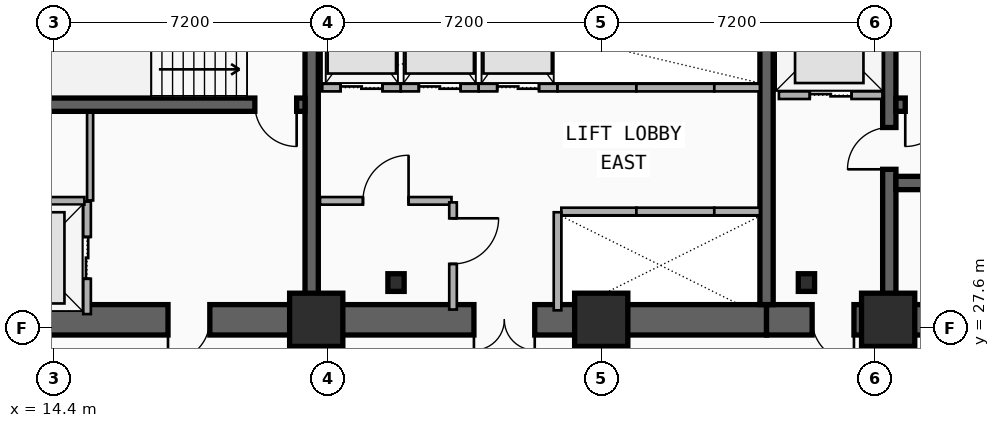
"""IFC4 building model, lengths in metres.
Left out: names, types, materials, properties, quantities, classifications, styles, units other than length and angle.
Written with IfcOpenShell. Run it as: python <this file> out.ifc"""

import sys

from ifc_helpers import new_model, si_unit, direction, frame, frame_2d, origin, origin_2d, place, context, subcontext, project, spatial, rectangle, i_section, extrude, element, fill, save


model = new_model("IFC4")
c1 = context("Model", 3, precision=1e-05, world=origin(), true_north=direction((0.0, 1.0)))
c2 = subcontext(c1, "Body", "Model", "MODEL_VIEW")
j1 = project(units=[si_unit("LENGTHUNIT", "METRE"), si_unit("PLANEANGLEUNIT", "RADIAN")], contexts=[c1])
p1 = place(None, origin())
s1 = spatial("IfcSite", under=j1, at=p1, CompositionType="ELEMENT")
p2 = place(p1, origin())
s2 = spatial("IfcBuilding", under=s1, at=p2, CompositionType="ELEMENT")
p3 = place(p2, frame((0.0, 0.0, 29.0)))
s3 = spatial("IfcBuildingStorey", under=s2, at=p3, CompositionType="ELEMENT", Elevation=29.0)
p4 = place(p3, frame((21.18, 27.82, 0.0), z_axis=(0.0, 0.0, 1.0), x_axis=(-1.0, 0.0, 0.0)))
e1 = element("IfcWall", 1, at=p4, inside=s3, PredefinedType="SHEAR", context=c2, shape_type="SweptSolid", body=[
    extrude(rectangle(XDim=9.03, YDim=0.8, at=frame_2d((4.515, 0.0))), origin(), (0.0, 0.0, 1.0), 3.5),
])
p5 = place(p4, frame((2.68, 0.0, 0.0)))
e2 = element("IfcOpeningElement", 2, at=p5, cuts=e1, PredefinedType="OPENING", context=c2, shape_type="SweptSolid", body=[
    extrude(rectangle(XDim=1.1, YDim=2.15, at=frame_2d((0.55, 1.075))), frame((0.0, 0.41, 0.0), z_axis=(0.0, -1.0, 0.0), x_axis=(1.0, 0.0, 0.0)), (0.0, 0.0, 1.0), 0.82),
])
p6 = place(p3, frame((33.15, 27.82, 0.0), z_axis=(0.0, 0.0, 1.0), x_axis=(-1.0, 0.0, 0.0)))
e3 = element("IfcWall", 3, at=p6, inside=s3, PredefinedType="SHEAR", context=c2, shape_type="SweptSolid", body=[
    extrude(rectangle(XDim=11.97, YDim=0.8, at=frame_2d((5.985, 0.0))), origin(), (0.0, 0.0, 1.0), 3.5),
])
p7 = place(p6, frame((6.1, 0.0, 0.0)))
e4 = element("IfcOpeningElement", 4, at=p7, cuts=e3, PredefinedType="OPENING", context=c2, shape_type="SweptSolid", body=[
    extrude(rectangle(XDim=1.6, YDim=2.2, at=frame_2d((0.8, 1.1))), frame((0.0, 0.41, 0.0), z_axis=(0.0, -1.0, 0.0), x_axis=(1.0, 0.0, 0.0)), (0.0, 0.0, 1.0), 0.82),
])
p8 = place(p3, frame((45.38, 27.82, 0.0), z_axis=(0.0, 0.0, 1.0), x_axis=(-1.0, 0.0, 0.0)))
e5 = element("IfcWall", 5, at=p8, inside=s3, PredefinedType="SHEAR", context=c2, shape_type="SweptSolid", body=[
    extrude(rectangle(XDim=12.23, YDim=0.8, at=frame_2d((6.115, 0.0))), origin(), (0.0, 0.0, 1.0), 3.5),
])
p9 = place(p8, frame((9.93, 0.0, 0.0)))
e6 = element("IfcOpeningElement", 6, at=p9, cuts=e5, PredefinedType="OPENING", context=c2, shape_type="SweptSolid", body=[
    extrude(rectangle(XDim=1.1, YDim=2.15, at=frame_2d((0.55, 1.075))), frame((0.0, 0.41, 0.0), z_axis=(0.0, -1.0, 0.0), x_axis=(1.0, 0.0, 0.0)), (0.0, 0.0, 1.0), 0.82),
])
p10 = place(p8, frame((6.23, 0.0, 0.0)))
e7 = element("IfcOpeningElement", 7, at=p10, cuts=e5, PredefinedType="OPENING", context=c2, shape_type="SweptSolid", body=[
    extrude(rectangle(XDim=1.1, YDim=2.15, at=frame_2d((0.55, 1.075))), frame((0.0, 0.41, 0.0), z_axis=(0.0, -1.0, 0.0), x_axis=(1.0, 0.0, 0.0)), (0.0, 0.0, 1.0), 0.82),
])
for number, where, z_axis, x_axis in (
    (8, (21.18, 28.22, 0.0), (0.0, 0.0, 1.0), (0.0, 1.0, 0.0)),
    (9, (33.15, 28.22, 0.0), (0.0, 0.0, 1.0), (0.0, 1.0, 0.0)),
):
    element("IfcWall", number, at=place(p3, frame(where, z_axis=z_axis, x_axis=x_axis)), inside=s3, PredefinedType="SHEAR", context=c2, shape_type="SweptSolid", body=[
        extrude(rectangle(XDim=8.43, YDim=0.35, at=frame_2d((4.215, 0.0))), origin(), (0.0, 0.0, 1.0), 3.5),
    ])
p11 = place(p3, frame((36.38, 28.22, 0.0), z_axis=(0.0, 0.0, 1.0), x_axis=(0.0, 1.0, 0.0)))
e10 = element("IfcWall", 10, at=p11, inside=s3, PredefinedType="SHEAR", context=c2, shape_type="SweptSolid", body=[
    extrude(rectangle(XDim=8.43, YDim=0.35, at=frame_2d((4.215, 0.0))), origin(), (0.0, 0.0, 1.0), 3.5),
])
p12 = place(p11, frame((3.56, 0.0, 0.0)))
e11 = element("IfcOpeningElement", 11, at=p12, cuts=e10, PredefinedType="OPENING", context=c2, shape_type="SweptSolid", body=[
    extrude(rectangle(XDim=1.1, YDim=2.15, at=frame_2d((0.55, 1.075))), frame((0.0, 0.185, 0.0), z_axis=(0.0, -1.0, 0.0), x_axis=(1.0, 0.0, 0.0)), (0.0, 0.0, 1.0), 0.37),
])
p13 = place(p3, frame((21.005, 33.48, 0.0), z_axis=(0.0, 0.0, 1.0), x_axis=(-1.0, 0.0, 0.0)))
e12 = element("IfcWall", 12, at=p13, inside=s3, PredefinedType="SHEAR", context=c2, shape_type="SweptSolid", body=[
    extrude(rectangle(XDim=8.455, YDim=0.35, at=frame_2d((4.228, 0.0))), origin(), (0.0, 0.0, 1.0), 3.5),
])
p14 = place(p13, frame((0.22, 0.0, 0.0)))
e13 = element("IfcOpeningElement", 13, at=p14, cuts=e12, PredefinedType="OPENING", context=c2, shape_type="SweptSolid", body=[
    extrude(rectangle(XDim=1.1, YDim=2.15, at=frame_2d((0.55, 1.075))), frame((0.0, 0.185, 0.0), z_axis=(0.0, -1.0, 0.0), x_axis=(1.0, 0.0, 0.0)), (0.0, 0.0, 1.0), 0.37),
])
p15 = place(p3, frame((44.98, 33.48, 0.0), z_axis=(0.0, 0.0, 1.0), x_axis=(-1.0, 0.0, 0.0)))
e14 = element("IfcWall", 14, at=p15, inside=s3, PredefinedType="SHEAR", context=c2, shape_type="SweptSolid", body=[
    extrude(rectangle(XDim=8.425, YDim=0.35, at=frame_2d((4.212, 0.0))), origin(), (0.0, 0.0, 1.0), 3.5),
])
p16 = place(p15, frame((7.08, 0.0, 0.0)))
e15 = element("IfcOpeningElement", 15, at=p16, cuts=e14, PredefinedType="OPENING", context=c2, shape_type="SweptSolid", body=[
    extrude(rectangle(XDim=1.1, YDim=2.15, at=frame_2d((0.55, 1.075))), frame((0.0, 0.185, 0.0), z_axis=(0.0, -1.0, 0.0), x_axis=(1.0, 0.0, 0.0)), (0.0, 0.0, 1.0), 0.37),
])
p17 = place(p3, frame((36.555, 31.42, 0.0), z_axis=(0.0, 0.0, 1.0), x_axis=(1.0, 0.0, 0.0)))
e16 = element("IfcWall", 16, at=p17, inside=s3, PredefinedType="SHEAR", context=c2, shape_type="SweptSolid", body=[
    extrude(rectangle(XDim=8.425, YDim=0.35, at=frame_2d((4.212, 0.0))), origin(), (0.0, 0.0, 1.0), 3.5),
])
for number, where, z_axis, x_axis in (
    (17, (23.4, 28.8, 0.0), (0.0, 0.0, 1.0), (1.0, 0.0, 0.0)),
    (18, (34.2, 28.8, 0.0), (0.0, 0.0, 1.0), (1.0, 0.0, 0.0)),
):
    element("IfcColumn", number, at=place(p3, frame(where, z_axis=z_axis, x_axis=x_axis)), inside=s3, PredefinedType="COLUMN", context=c2, shape_type="SweptSolid", body=[
        extrude(i_section(OverallWidth=0.428, OverallDepth=0.465, WebThickness=0.045, FlangeThickness=0.073, FilletRadius=0.015, at=origin_2d()), origin(), (0.0, 0.0, 1.0), 3.5),
    ])
for number, where, z_axis, x_axis in (
    (19, (21.3, 27.82, 0.0), (0.0, 0.0, 1.0), (1.0, 0.0, 0.0)),
    (20, (28.8, 27.82, 0.0), (0.0, 0.0, 1.0), (1.0, 0.0, 0.0)),
    (21, (36.35, 27.82, 0.0), (0.0, 0.0, 1.0), (1.0, 0.0, 0.0)),
):
    element("IfcColumn", number, at=place(p3, frame(where, z_axis=z_axis, x_axis=x_axis)), inside=s3, PredefinedType="COLUMN", context=c2, shape_type="SweptSolid", body=[
        extrude(rectangle(XDim=1.4, YDim=1.4, at=origin_2d()), origin(), (0.0, 0.0, 1.0), 3.5),
    ])
p18 = place(p3, frame((15.27, 27.97, 0.0), z_axis=(0.0, 0.0, 1.0), x_axis=(0.0, 1.0, 0.0)))
e22 = element("IfcWall", 22, at=p18, inside=s3, PredefinedType="PARTITIONING", context=c2, shape_type="SweptSolid", body=[
    extrude(rectangle(XDim=2.96, YDim=0.2, at=frame_2d((1.48, 0.0))), origin(), (0.0, 0.0, 1.0), 2.212),
])
p19 = place(p18, frame((0.93, 0.0, 0.0)))
e23 = element("IfcOpeningElement", 23, at=p19, cuts=e22, PredefinedType="OPENING", context=c2, shape_type="SweptSolid", body=[
    extrude(rectangle(XDim=1.1, YDim=2.15, at=frame_2d((0.55, 1.075))), frame((0.0, 0.11, 0.0), z_axis=(0.0, -1.0, 0.0), x_axis=(1.0, 0.0, 0.0)), (0.0, 0.0, 1.0), 0.22),
])
p20 = place(p3, frame((12.45, 30.95, 0.0), z_axis=(0.0, 0.0, 1.0), x_axis=(1.0, 0.0, 0.0)))
e24 = element("IfcWall", 24, at=p20, inside=s3, PredefinedType="PARTITIONING", context=c2, shape_type="SweptSolid", body=[
    extrude(rectangle(XDim=2.75, YDim=0.2, at=frame_2d((1.375, 0.0))), origin(), (0.0, 0.0, 1.0), 2.212),
])
p21 = place(p3, frame((33.475, 33.73, 0.0), z_axis=(0.0, 0.0, 1.0), x_axis=(1.0, 0.0, 0.0)))
e25 = element("IfcWall", 25, at=p21, inside=s3, PredefinedType="PARTITIONING", context=c2, shape_type="SweptSolid", body=[
    extrude(rectangle(XDim=2.725, YDim=0.2, at=frame_2d((1.362, 0.0))), origin(), (0.0, 0.0, 1.0), 2.212),
])
p22 = place(p21, frame((0.812, 0.0, 0.0)))
e26 = element("IfcOpeningElement", 26, at=p22, cuts=e25, PredefinedType="OPENING", context=c2, shape_type="SweptSolid", body=[
    extrude(rectangle(XDim=1.1, YDim=2.15, at=frame_2d((0.55, 1.075))), frame((0.0, 0.11, 0.0), z_axis=(0.0, -1.0, 0.0), x_axis=(1.0, 0.0, 0.0)), (0.0, 0.0, 1.0), 0.22),
])
p23 = place(p3, frame((27.75, 30.67, 0.0), z_axis=(0.0, 0.0, 1.0), x_axis=(1.0, 0.0, 0.0)))
e27 = element("IfcWall", 27, at=p23, inside=s3, PredefinedType="PARTITIONING", context=c2, shape_type="SweptSolid", body=[
    extrude(rectangle(XDim=1.975, YDim=0.2, at=frame_2d((0.988, 0.0))), origin(), (0.0, 0.0, 1.0), 2.212),
])
p24 = place(p3, frame((27.65, 28.07, 0.0), z_axis=(0.0, 0.0, 1.0), x_axis=(0.0, 1.0, 0.0)))
e28 = element("IfcWall", 28, at=p24, inside=s3, PredefinedType="PARTITIONING", context=c2, shape_type="SweptSolid", body=[
    extrude(rectangle(XDim=2.58, YDim=0.2, at=frame_2d((1.29, 0.0))), origin(), (0.0, 0.0, 1.0), 2.212),
])
p25 = place(p3, frame((29.725, 30.67, 0.0), z_axis=(0.0, 0.0, 1.0), x_axis=(1.0, 0.0, 0.0)))
e29 = element("IfcWall", 29, at=p25, inside=s3, PredefinedType="PARTITIONING", context=c2, shape_type="SweptSolid", body=[
    extrude(rectangle(XDim=2.05, YDim=0.2, at=frame_2d((1.025, 0.0))), origin(), (0.0, 0.0, 1.0), 2.62),
])
p26 = place(p3, frame((31.775, 30.67, 0.0), z_axis=(0.0, 0.0, 1.0), x_axis=(1.0, 0.0, 0.0)))
e30 = element("IfcWall", 30, at=p26, inside=s3, PredefinedType="PARTITIONING", context=c2, shape_type="SweptSolid", body=[
    extrude(rectangle(XDim=1.2, YDim=0.2, at=frame_2d((0.6, 0.0))), origin(), (0.0, 0.0, 1.0), 2.62),
])
p27 = place(p3, frame((21.46, 33.93, 0.0), z_axis=(0.0, 0.0, 1.0), x_axis=(1.0, 0.0, 0.0)))
e31 = element("IfcWall", 31, at=p27, inside=s3, PredefinedType="PARTITIONING", context=c2, shape_type="SweptSolid", body=[
    extrude(rectangle(XDim=2.065, YDim=0.2, at=frame_2d((1.032, 0.0))), origin(), (0.0, 0.0, 1.0), 2.212),
])
p28 = place(p27, frame((0.482, 0.0, 0.0)))
e32 = element("IfcOpeningElement", 32, at=p28, cuts=e31, PredefinedType="OPENING", context=c2, shape_type="SweptSolid", body=[
    extrude(rectangle(XDim=1.1, YDim=2.15, at=frame_2d((0.55, 1.075))), frame((0.0, 0.11, 0.0), z_axis=(0.0, -1.0, 0.0), x_axis=(1.0, 0.0, 0.0)), (0.0, 0.0, 1.0), 0.22),
])
p29 = place(p3, frame((23.525, 33.93, 0.0), z_axis=(0.0, 0.0, 1.0), x_axis=(1.0, 0.0, 0.0)))
e33 = element("IfcWall", 33, at=p29, inside=s3, PredefinedType="PARTITIONING", context=c2, shape_type="SweptSolid", body=[
    extrude(rectangle(XDim=2.05, YDim=0.2, at=frame_2d((1.025, 0.0))), origin(), (0.0, 0.0, 1.0), 3.24),
])
p30 = place(p29, frame((0.475, 0.0, 0.0)))
e34 = element("IfcOpeningElement", 34, at=p30, cuts=e33, PredefinedType="OPENING", context=c2, shape_type="SweptSolid", body=[
    extrude(rectangle(XDim=1.1, YDim=2.15, at=frame_2d((0.55, 1.075))), frame((0.0, 0.11, 0.0), z_axis=(0.0, -1.0, 0.0), x_axis=(1.0, 0.0, 0.0)), (0.0, 0.0, 1.0), 0.22),
])
p31 = place(p3, frame((25.575, 33.93, 0.0), z_axis=(0.0, 0.0, 1.0), x_axis=(1.0, 0.0, 0.0)))
e35 = element("IfcWall", 35, at=p31, inside=s3, PredefinedType="PARTITIONING", context=c2, shape_type="SweptSolid", body=[
    extrude(rectangle(XDim=2.075, YDim=0.2, at=frame_2d((1.038, 0.0))), origin(), (0.0, 0.0, 1.0), 3.24),
])
p32 = place(p31, frame((0.488, 0.0, 0.0)))
e36 = element("IfcOpeningElement", 36, at=p32, cuts=e35, PredefinedType="OPENING", context=c2, shape_type="SweptSolid", body=[
    extrude(rectangle(XDim=1.1, YDim=2.15, at=frame_2d((0.55, 1.075))), frame((0.0, 0.11, 0.0), z_axis=(0.0, -1.0, 0.0), x_axis=(1.0, 0.0, 0.0)), (0.0, 0.0, 1.0), 0.22),
])
p33 = place(p3, frame((27.65, 33.93, 0.0), z_axis=(0.0, 0.0, 1.0), x_axis=(1.0, 0.0, 0.0)))
e37 = element("IfcWall", 37, at=p33, inside=s3, PredefinedType="PARTITIONING", context=c2, shape_type="SweptSolid", body=[
    extrude(rectangle(XDim=2.075, YDim=0.2, at=frame_2d((1.038, 0.0))), origin(), (0.0, 0.0, 1.0), 2.212),
])
p34 = place(p3, frame((29.725, 33.93, 0.0), z_axis=(0.0, 0.0, 1.0), x_axis=(1.0, 0.0, 0.0)))
e38 = element("IfcWall", 38, at=p34, inside=s3, PredefinedType="PARTITIONING", context=c2, shape_type="SweptSolid", body=[
    extrude(rectangle(XDim=2.05, YDim=0.2, at=frame_2d((1.025, 0.0))), origin(), (0.0, 0.0, 1.0), 3.24),
])
p35 = place(p3, frame((31.775, 33.93, 0.0), z_axis=(0.0, 0.0, 1.0), x_axis=(1.0, 0.0, 0.0)))
e39 = element("IfcWall", 39, at=p35, inside=s3, PredefinedType="PARTITIONING", context=c2, shape_type="SweptSolid", body=[
    extrude(rectangle(XDim=1.2, YDim=0.2, at=frame_2d((0.6, 0.0))), origin(), (0.0, 0.0, 1.0), 3.24),
])
p36 = place(p3, frame((21.4, 30.95, 0.0), z_axis=(0.0, 0.0, 1.0), x_axis=(1.0, 0.0, 0.0)))
e40 = element("IfcWall", 40, at=p36, inside=s3, PredefinedType="PARTITIONING", context=c2, shape_type="SweptSolid", body=[
    extrude(rectangle(XDim=3.46, YDim=0.2, at=frame_2d((1.73, 0.0))), origin(), (0.0, 0.0, 1.0), 2.28),
])
p37 = place(p36, frame((1.13, 0.0, 0.0)))
e41 = element("IfcOpeningElement", 41, at=p37, cuts=e40, PredefinedType="OPENING", context=c2, shape_type="SweptSolid", body=[
    extrude(rectangle(XDim=1.2, YDim=2.15, at=frame_2d((0.6, 1.075))), frame((0.0, 0.11, 0.0), z_axis=(0.0, -1.0, 0.0), x_axis=(1.0, 0.0, 0.0)), (0.0, 0.0, 1.0), 0.22),
])
p38 = place(p3, frame((24.9, 30.91, 0.0), z_axis=(0.0, 0.0, 1.0), x_axis=(0.0, -1.0, 0.0)))
e42 = element("IfcWall", 42, at=p38, inside=s3, PredefinedType="PARTITIONING", context=c2, shape_type="SweptSolid", body=[
    extrude(rectangle(XDim=2.82, YDim=0.2, at=frame_2d((1.41, 0.0))), origin(), (0.0, 0.0, 1.0), 2.62),
])
p39 = place(p38, frame((0.419, 0.0, 0.0)))
e43 = element("IfcOpeningElement", 43, at=p39, cuts=e42, PredefinedType="OPENING", context=c2, shape_type="SweptSolid", body=[
    extrude(rectangle(XDim=1.2, YDim=2.15, at=frame_2d((0.6, 1.075))), frame((0.0, 0.11, 0.0), z_axis=(0.0, -1.0, 0.0), x_axis=(1.0, 0.0, 0.0)), (0.0, 0.0, 1.0), 0.22),
])
p40 = place(p3, frame((15.35, 30.96, 0.0), z_axis=(0.0, 0.0, 1.0), x_axis=(0.0, 1.0, 0.0)))
e44 = element("IfcWall", 44, at=p40, inside=s3, PredefinedType="PARTITIONING", context=c2, shape_type="SweptSolid", body=[
    extrude(rectangle(XDim=2.31, YDim=0.16, at=frame_2d((1.155, 0.0))), origin(), (0.0, 0.0, 1.0), 3.24),
])
p41 = place(p19, origin())
e45 = element("IfcDoor", 45, at=p41, inside=s3, OperationType="DOUBLE_DOOR_SLIDING", PredefinedType="DOOR", context=c2, shape_type="SweptSolid", body=[
    extrude(rectangle(XDim=1.1, YDim=2.15, at=frame_2d((0.55, 1.075))), frame((0.0, 0.025, 0.0), z_axis=(0.0, -1.0, 0.0), x_axis=(1.0, 0.0, 0.0)), (0.0, 0.0, 1.0), 0.05),
])
fill(e23, e45)
p42 = place(p22, origin())
e46 = element("IfcDoor", 46, at=p42, inside=s3, OperationType="DOUBLE_DOOR_SLIDING", PredefinedType="DOOR", context=c2, shape_type="SweptSolid", body=[
    extrude(rectangle(XDim=1.1, YDim=2.15, at=frame_2d((0.55, 1.075))), frame((0.0, 0.025, 0.0), z_axis=(0.0, -1.0, 0.0), x_axis=(1.0, 0.0, 0.0)), (0.0, 0.0, 1.0), 0.05),
])
fill(e26, e46)
p43 = place(p28, origin())
e47 = element("IfcDoor", 47, at=p43, inside=s3, OperationType="DOUBLE_DOOR_SLIDING", PredefinedType="DOOR", context=c2, shape_type="SweptSolid", body=[
    extrude(rectangle(XDim=1.1, YDim=2.15, at=frame_2d((0.55, 1.075))), frame((0.0, 0.025, 0.0), z_axis=(0.0, -1.0, 0.0), x_axis=(1.0, 0.0, 0.0)), (0.0, 0.0, 1.0), 0.05),
])
fill(e32, e47)
p44 = place(p30, origin())
e48 = element("IfcDoor", 48, at=p44, inside=s3, OperationType="DOUBLE_DOOR_SLIDING", PredefinedType="DOOR", context=c2, shape_type="SweptSolid", body=[
    extrude(rectangle(XDim=1.1, YDim=2.15, at=frame_2d((0.55, 1.075))), frame((0.0, 0.025, 0.0), z_axis=(0.0, -1.0, 0.0), x_axis=(1.0, 0.0, 0.0)), (0.0, 0.0, 1.0), 0.05),
])
fill(e34, e48)
p45 = place(p32, origin())
e49 = element("IfcDoor", 49, at=p45, inside=s3, OperationType="DOUBLE_DOOR_SLIDING", PredefinedType="DOOR", context=c2, shape_type="SweptSolid", body=[
    extrude(rectangle(XDim=1.1, YDim=2.15, at=frame_2d((0.55, 1.075))), frame((0.0, 0.025, 0.0), z_axis=(0.0, -1.0, 0.0), x_axis=(1.0, 0.0, 0.0)), (0.0, 0.0, 1.0), 0.05),
])
fill(e36, e49)
p46 = place(p14, origin())
e50 = element("IfcDoor", 50, at=p46, inside=s3, OperationType="SINGLE_SWING_LEFT", PredefinedType="DOOR", context=c2, shape_type="SweptSolid", body=[
    extrude(rectangle(XDim=1.1, YDim=2.15, at=frame_2d((0.55, 1.075))), frame((0.0, 0.025, 0.0), z_axis=(0.0, -1.0, 0.0), x_axis=(1.0, 0.0, 0.0)), (0.0, 0.0, 1.0), 0.05),
])
fill(e13, e50)
p47 = place(p5, origin())
e51 = element("IfcDoor", 51, at=p47, inside=s3, OperationType="SINGLE_SWING_RIGHT", PredefinedType="DOOR", context=c2, shape_type="SweptSolid", body=[
    extrude(rectangle(XDim=1.1, YDim=2.15, at=frame_2d((0.55, 1.075))), frame((0.0, 0.025, 0.0), z_axis=(0.0, -1.0, 0.0), x_axis=(1.0, 0.0, 0.0)), (0.0, 0.0, 1.0), 0.05),
])
fill(e2, e51)
p48 = place(p16, origin())
e52 = element("IfcDoor", 52, at=p48, inside=s3, OperationType="SINGLE_SWING_RIGHT", PredefinedType="DOOR", context=c2, shape_type="SweptSolid", body=[
    extrude(rectangle(XDim=1.1, YDim=2.15, at=frame_2d((0.55, 1.075))), frame((0.0, 0.025, 0.0), z_axis=(0.0, -1.0, 0.0), x_axis=(1.0, 0.0, 0.0)), (0.0, 0.0, 1.0), 0.05),
])
fill(e15, e52)
p49 = place(p12, origin())
e53 = element("IfcDoor", 53, at=p49, inside=s3, OperationType="SINGLE_SWING_LEFT", PredefinedType="DOOR", context=c2, shape_type="SweptSolid", body=[
    extrude(rectangle(XDim=1.1, YDim=2.15, at=frame_2d((0.55, 1.075))), frame((0.0, 0.025, 0.0), z_axis=(0.0, -1.0, 0.0), x_axis=(1.0, 0.0, 0.0)), (0.0, 0.0, 1.0), 0.05),
])
fill(e11, e53)
p50 = place(p9, origin())
e54 = element("IfcDoor", 54, at=p50, inside=s3, OperationType="SINGLE_SWING_LEFT", PredefinedType="DOOR", context=c2, shape_type="SweptSolid", body=[
    extrude(rectangle(XDim=1.1, YDim=2.15, at=frame_2d((0.55, 1.075))), frame((0.0, 0.025, 0.0), z_axis=(0.0, -1.0, 0.0), x_axis=(1.0, 0.0, 0.0)), (0.0, 0.0, 1.0), 0.05),
])
fill(e6, e54)
p51 = place(p7, origin())
e55 = element("IfcDoor", 55, at=p51, inside=s3, OperationType="SINGLE_SWING_LEFT", PredefinedType="DOOR", context=c2, shape_type="SweptSolid", body=[
    extrude(rectangle(XDim=1.6, YDim=2.2, at=frame_2d((0.8, 1.1))), frame((0.0, 0.025, 0.0), z_axis=(0.0, -1.0, 0.0), x_axis=(1.0, 0.0, 0.0)), (0.0, 0.0, 1.0), 0.05),
])
fill(e4, e55)
p52 = place(p37, origin())
e56 = element("IfcDoor", 56, at=p52, inside=s3, OperationType="SINGLE_SWING_RIGHT", PredefinedType="DOOR", context=c2, shape_type="SweptSolid", body=[
    extrude(rectangle(XDim=1.2, YDim=2.15, at=frame_2d((0.6, 1.075))), frame((0.0, 0.025, 0.0), z_axis=(0.0, -1.0, 0.0), x_axis=(1.0, 0.0, 0.0)), (0.0, 0.0, 1.0), 0.05),
])
fill(e41, e56)
p53 = place(p39, origin())
e57 = element("IfcDoor", 57, at=p53, inside=s3, OperationType="SINGLE_SWING_LEFT", PredefinedType="DOOR", context=c2, shape_type="SweptSolid", body=[
    extrude(rectangle(XDim=1.2, YDim=2.15, at=frame_2d((0.6, 1.075))), frame((0.0, 0.025, 0.0), z_axis=(0.0, -1.0, 0.0), x_axis=(1.0, 0.0, 0.0)), (0.0, 0.0, 1.0), 0.05),
])
fill(e43, e57)
save(model, sys.argv[1])
